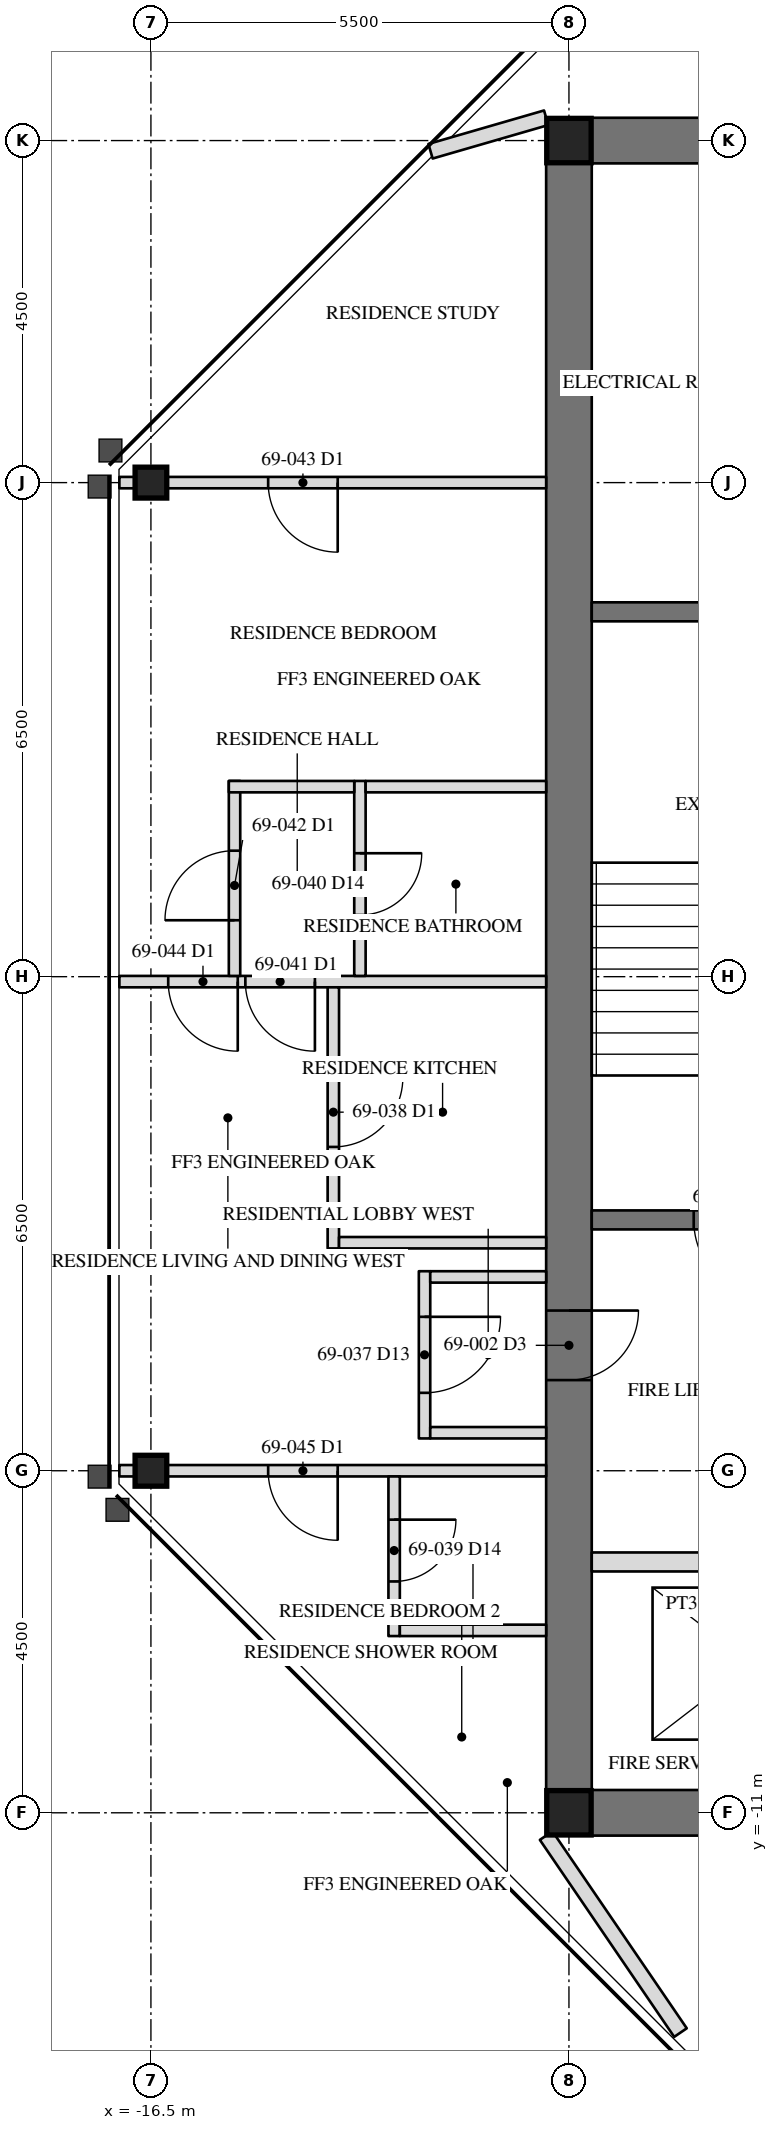
"""IFC4 building model, lengths in metres.
Left out: names, types, materials, properties, quantities, classifications, styles, units other than length and angle.
Written with IfcOpenShell. Run it as: python <this file> out.ifc"""

import sys

from ifc_helpers import new_model, si_unit, direction, frame, frame_2d, origin, origin_2d, place, context, subcontext, project, spatial, rectangle, hollow_rectangle, i_section, extrude, element, fill, save


model = new_model("IFC4")
c1 = context("Model", 3, precision=1e-05, world=origin(), true_north=direction((0.0, 1.0)))
c2 = subcontext(c1, "Body", "Model", "MODEL_VIEW")
j1 = project(units=[si_unit("LENGTHUNIT", "METRE"), si_unit("PLANEANGLEUNIT", "RADIAN")], contexts=[c1])
p1 = place(None, origin())
s1 = spatial("IfcSite", under=j1, at=p1, CompositionType="ELEMENT")
p2 = place(p1, origin())
s2 = spatial("IfcBuilding", under=s1, at=p2, CompositionType="ELEMENT")
p3 = place(p2, frame((0.0, 0.0, 281.2)))
s3 = spatial("IfcBuildingStorey", under=s2, at=p3, CompositionType="ELEMENT", Elevation=281.2)
for number, where, z_axis, x_axis in (
    (1, (-16.5, -6.5, 0.0), (0.0, 0.0, 1.0), (0.0, 1.0, 0.0)),
    (2, (-16.5, 6.5, 0.0), (0.0, 0.0, 1.0), (0.0, 1.0, 0.0)),
):
    element("IfcColumn", number, at=place(p3, frame(where, z_axis=z_axis, x_axis=x_axis)), inside=s3, PredefinedType="COLUMN", context=c2, shape_type="SweptSolid", body=[
        extrude(i_section(OverallWidth=0.406, OverallDepth=0.417, WebThickness=0.03, FlangeThickness=0.048, at=origin_2d()), origin(), (0.0, 0.0, 1.0), 3.6),
    ])
p4 = place(p3, frame((-11.0, 11.0, 0.0), z_axis=(0.0, 0.0, 1.0), x_axis=(0.0, -1.0, 0.0)))
e3 = element("IfcWall", 3, at=p4, inside=s3, PredefinedType="SHEAR", context=c2, shape_type="SweptSolid", body=[
    extrude(rectangle(XDim=22.0, YDim=0.6, at=frame_2d((11.0, 0.0))), origin(), (0.0, 0.0, 1.0), 3.6),
])
p5 = place(p4, frame((15.393, 0.0, 0.0)))
e4 = element("IfcOpeningElement", 4, at=p5, cuts=e3, PredefinedType="OPENING", context=c2, shape_type="SweptSolid", body=[
    extrude(rectangle(XDim=0.915, YDim=2.134, at=frame_2d((0.458, 1.067))), frame((0.0, 0.31, 0.0), z_axis=(0.0, -1.0, 0.0), x_axis=(1.0, 0.0, 0.0)), (0.0, 0.0, 1.0), 0.62),
])
for number, where, z_axis, x_axis in (
    (5, (-6.5, 11.0, 0.0), (0.0, 0.0, 1.0), (-1.0, 0.0, 0.0)),
    (6, (-11.0, -11.0, 0.0), (0.0, 0.0, 1.0), (1.0, 0.0, 0.0)),
):
    element("IfcWall", number, at=place(p3, frame(where, z_axis=z_axis, x_axis=x_axis)), inside=s3, PredefinedType="SHEAR", context=c2, shape_type="SweptSolid", body=[
        extrude(rectangle(XDim=4.5, YDim=0.6, at=frame_2d((2.25, 0.0))), origin(), (0.0, 0.0, 1.0), 3.6),
    ])
for number, where, z_axis, x_axis in (
    (7, (-11.0, 11.0, 0.0), (0.0, 0.0, 1.0), (1.0, 0.0, 0.0)),
    (8, (-11.0, -11.0, 0.0), (0.0, 0.0, 1.0), (1.0, 0.0, 0.0)),
):
    element("IfcColumn", number, at=place(p3, frame(where, z_axis=z_axis, x_axis=x_axis)), inside=s3, PredefinedType="COLUMN", context=c2, shape_type="SweptSolid", body=[
        extrude(hollow_rectangle(XDim=0.584, YDim=0.584, WallThickness=0.051, at=origin_2d()), origin(), (0.0, 0.0, 1.0), 3.6),
    ])
p6 = place(p3, frame((-6.95, 4.8, 0.0), z_axis=(0.0, 0.0, 1.0), x_axis=(-1.0, 0.0, 0.0)))
e9 = element("IfcWall", 9, at=p6, inside=s3, PredefinedType="SOLIDWALL", context=c2, shape_type="SweptSolid", body=[
    extrude(rectangle(XDim=3.75, YDim=0.25, at=frame_2d((1.875, 0.0))), origin(), (0.0, 0.0, 1.0), 3.41),
])
p7 = place(p3, frame((-6.95, -3.2, 0.0), z_axis=(0.0, 0.0, 1.0), x_axis=(-1.0, 0.0, 0.0)))
e10 = element("IfcWall", 10, at=p7, inside=s3, PredefinedType="SOLIDWALL", context=c2, shape_type="SweptSolid", body=[
    extrude(rectangle(XDim=3.75, YDim=0.25, at=frame_2d((1.875, 0.0))), origin(), (0.0, 0.0, 1.0), 3.41),
])
p8 = place(p7, frame((1.342, 0.0, 0.0)))
e11 = element("IfcOpeningElement", 11, at=p8, cuts=e10, PredefinedType="OPENING", context=c2, shape_type="SweptSolid", body=[
    extrude(rectangle(XDim=1.067, YDim=2.134, at=frame_2d((0.533, 1.067))), frame((0.0, 0.135, 0.0), z_axis=(0.0, -1.0, 0.0), x_axis=(1.0, 0.0, 0.0)), (0.0, 0.0, 1.0), 0.27),
])
p9 = place(p3, frame((-6.95, -7.7, 0.0), z_axis=(0.0, 0.0, 1.0), x_axis=(-1.0, 0.0, 0.0)))
e12 = element("IfcWall", 12, at=p9, inside=s3, PredefinedType="PARTITIONING", context=c2, shape_type="SweptSolid", body=[
    extrude(rectangle(XDim=3.75, YDim=0.25, at=frame_2d((1.875, 0.0))), origin(), (0.0, 0.0, 1.0), 3.41),
])
p10 = place(p9, frame((0.45, 0.0, 0.0)))
e13 = element("IfcOpeningElement", 13, at=p10, cuts=e12, PredefinedType="OPENING", context=c2, shape_type="SweptSolid", body=[
    extrude(rectangle(XDim=1.219, YDim=2.134, at=frame_2d((0.609, 1.067))), frame((0.0, 0.135, 0.0), z_axis=(0.0, -1.0, 0.0), x_axis=(1.0, 0.0, 0.0)), (0.0, 0.0, 1.0), 0.27),
])
p11 = place(p3, frame((-11.3, 11.3, 0.0), z_axis=(0.0, 0.0, 1.0), x_axis=(-0.960552344683, -0.278099250491, 0.0)))
e14 = element("IfcWall", 14, at=p11, inside=s3, PredefinedType="PARTITIONING", context=c2, shape_type="SweptSolid", body=[
    extrude(rectangle(XDim=1.584, YDim=0.2, at=frame_2d((0.792, 0.0))), origin(), (0.0, 0.0, 1.0), 3.41),
])
p12 = place(p3, frame((-11.3, -11.3, 0.0), z_axis=(0.0, 0.0, 1.0), x_axis=(0.563469639691, -0.826136771453, 0.0)))
e15 = element("IfcWall", 15, at=p12, inside=s3, PredefinedType="PARTITIONING", context=c2, shape_type="SweptSolid", body=[
    extrude(rectangle(XDim=3.137, YDim=0.2, at=frame_2d((1.568, 0.0))), origin(), (0.0, 0.0, 1.0), 2.704),
])
p13 = place(p3, frame((-11.3, 6.5, 0.0), z_axis=(0.0, 0.0, 1.0), x_axis=(-1.0, 0.0, 0.0)))
e16 = element("IfcWall", 16, at=p13, inside=s3, PredefinedType="PARTITIONING", context=c2, shape_type="SweptSolid", body=[
    extrude(rectangle(XDim=5.615, YDim=0.15, at=frame_2d((2.808, 0.0))), origin(), (0.0, 0.0, 1.0), 2.966),
])
p14 = place(p13, frame((2.742, 0.0, 0.0)))
e17 = element("IfcOpeningElement", 17, at=p14, cuts=e16, PredefinedType="OPENING", context=c2, shape_type="SweptSolid", body=[
    extrude(rectangle(XDim=0.915, YDim=2.134, at=frame_2d((0.458, 1.067))), frame((0.0, 0.085, 0.0), z_axis=(0.0, -1.0, 0.0), x_axis=(1.0, 0.0, 0.0)), (0.0, 0.0, 1.0), 0.17),
])
p15 = place(p3, frame((-11.3, -0.065, 0.0), z_axis=(0.0, 0.0, 1.0), x_axis=(-1.0, 0.0, 0.0)))
e18 = element("IfcWall", 18, at=p15, inside=s3, PredefinedType="PARTITIONING", context=c2, shape_type="SweptSolid", body=[
    extrude(rectangle(XDim=5.615, YDim=0.15, at=frame_2d((2.808, 0.0))), origin(), (0.0, 0.0, 1.0), 2.709),
])
p16 = place(p15, frame((3.042, 0.0, 0.0)))
e19 = element("IfcOpeningElement", 19, at=p16, cuts=e18, PredefinedType="OPENING", context=c2, shape_type="SweptSolid", body=[
    extrude(rectangle(XDim=0.915, YDim=2.134, at=frame_2d((0.458, 1.067))), frame((0.0, 0.085, 0.0), z_axis=(0.0, -1.0, 0.0), x_axis=(1.0, 0.0, 0.0)), (0.0, 0.0, 1.0), 0.17),
])
p17 = place(p15, frame((4.058, 0.0, 0.0)))
e20 = element("IfcOpeningElement", 20, at=p17, cuts=e18, PredefinedType="OPENING", context=c2, shape_type="SweptSolid", body=[
    extrude(rectangle(XDim=0.915, YDim=2.134, at=frame_2d((0.458, 1.067))), frame((0.0, 0.085, 0.0), z_axis=(0.0, -1.0, 0.0), x_axis=(1.0, 0.0, 0.0)), (0.0, 0.0, 1.0), 0.17),
])
p18 = place(p3, frame((-11.3, -6.5, 0.0), z_axis=(0.0, 0.0, 1.0), x_axis=(-1.0, 0.0, 0.0)))
e21 = element("IfcWall", 21, at=p18, inside=s3, PredefinedType="PARTITIONING", context=c2, shape_type="SweptSolid", body=[
    extrude(rectangle(XDim=5.615, YDim=0.15, at=frame_2d((2.808, 0.0))), origin(), (0.0, 0.0, 1.0), 2.966),
])
p19 = place(p18, frame((2.742, 0.0, 0.0)))
e22 = element("IfcOpeningElement", 22, at=p19, cuts=e21, PredefinedType="OPENING", context=c2, shape_type="SweptSolid", body=[
    extrude(rectangle(XDim=0.915, YDim=2.134, at=frame_2d((0.458, 1.067))), frame((0.0, 0.085, 0.0), z_axis=(0.0, -1.0, 0.0), x_axis=(1.0, 0.0, 0.0)), (0.0, 0.0, 1.0), 0.17),
])
p20 = place(p3, frame((-12.9, -3.875, 0.0), z_axis=(0.0, 0.0, 1.0), x_axis=(0.0, -1.0, 0.0)))
e23 = element("IfcWall", 23, at=p20, inside=s3, PredefinedType="PARTITIONING", context=c2, shape_type="SweptSolid", body=[
    extrude(rectangle(XDim=2.2, YDim=0.15, at=frame_2d((1.1, 0.0))), origin(), (0.0, 0.0, 1.0), 3.41),
])
p21 = place(p20, frame((0.6, 0.0, 0.0)))
e24 = element("IfcOpeningElement", 24, at=p21, cuts=e23, PredefinedType="OPENING", context=c2, shape_type="SweptSolid", body=[
    extrude(rectangle(XDim=1.0, YDim=2.134, at=frame_2d((0.5, 1.067))), frame((0.0, 0.085, 0.0), z_axis=(0.0, -1.0, 0.0), x_axis=(1.0, 0.0, 0.0)), (0.0, 0.0, 1.0), 0.17),
])
for number, where, z_axis, x_axis in (
    (25, (-11.3, -3.95, 0.0), (0.0, 0.0, 1.0), (-1.0, 0.0, 0.0)),
    (26, (-11.3, -6.0, 0.0), (0.0, 0.0, 1.0), (-1.0, 0.0, 0.0)),
):
    element("IfcWall", number, at=place(p3, frame(where, z_axis=z_axis, x_axis=x_axis)), inside=s3, PredefinedType="PARTITIONING", context=c2, shape_type="SweptSolid", body=[
        extrude(rectangle(XDim=1.525, YDim=0.15, at=frame_2d((0.762, 0.0))), origin(), (0.0, 0.0, 1.0), 3.41),
    ])
p22 = place(p3, frame((-14.1, -0.14, 0.0), z_axis=(0.0, 0.0, 1.0), x_axis=(0.0, -1.0, 0.0)))
e27 = element("IfcWall", 27, at=p22, inside=s3, PredefinedType="PARTITIONING", context=c2, shape_type="SweptSolid", body=[
    extrude(rectangle(XDim=3.435, YDim=0.15, at=frame_2d((1.718, 0.0))), origin(), (0.0, 0.0, 1.0), 3.41),
])
p23 = place(p22, frame((1.185, 0.0, 0.0)))
e28 = element("IfcOpeningElement", 28, at=p23, cuts=e27, PredefinedType="OPENING", context=c2, shape_type="SweptSolid", body=[
    extrude(rectangle(XDim=0.915, YDim=2.134, at=frame_2d((0.458, 1.067))), frame((0.0, 0.085, 0.0), z_axis=(0.0, -1.0, 0.0), x_axis=(1.0, 0.0, 0.0)), (0.0, 0.0, 1.0), 0.17),
])
p24 = place(p3, frame((-11.3, -3.5, 0.0), z_axis=(0.0, 0.0, 1.0), x_axis=(-1.0, 0.0, 0.0)))
e29 = element("IfcWall", 29, at=p24, inside=s3, PredefinedType="PARTITIONING", context=c2, shape_type="SweptSolid", body=[
    extrude(rectangle(XDim=2.725, YDim=0.15, at=frame_2d((1.362, 0.0))), origin(), (0.0, 0.0, 1.0), 3.41),
])
p25 = place(p3, frame((-13.3, -6.575, 0.0), z_axis=(0.0, 0.0, 1.0), x_axis=(0.0, -1.0, 0.0)))
e30 = element("IfcWall", 30, at=p25, inside=s3, PredefinedType="PARTITIONING", context=c2, shape_type="SweptSolid", body=[
    extrude(rectangle(XDim=2.1, YDim=0.15, at=frame_2d((1.05, 0.0))), origin(), (0.0, 0.0, 1.0), 3.41),
])
p26 = place(p25, frame((0.569, 0.0, 0.0)))
e31 = element("IfcOpeningElement", 31, at=p26, cuts=e30, PredefinedType="OPENING", context=c2, shape_type="SweptSolid", body=[
    extrude(rectangle(XDim=0.813, YDim=2.032, at=frame_2d((0.406, 1.016))), frame((0.0, 0.085, 0.0), z_axis=(0.0, -1.0, 0.0), x_axis=(1.0, 0.0, 0.0)), (0.0, 0.0, 1.0), 0.17),
])
p27 = place(p3, frame((-11.3, -8.6, 0.0), z_axis=(0.0, 0.0, 1.0), x_axis=(-1.0, 0.0, 0.0)))
e32 = element("IfcWall", 32, at=p27, inside=s3, PredefinedType="PARTITIONING", context=c2, shape_type="SweptSolid", body=[
    extrude(rectangle(XDim=1.925, YDim=0.15, at=frame_2d((0.962, 0.0))), origin(), (0.0, 0.0, 1.0), 3.41),
])
p28 = place(p3, frame((-13.75, 2.575, 0.0), z_axis=(0.0, 0.0, 1.0), x_axis=(0.0, -1.0, 0.0)))
e33 = element("IfcWall", 33, at=p28, inside=s3, PredefinedType="PARTITIONING", context=c2, shape_type="SweptSolid", body=[
    extrude(rectangle(XDim=2.565, YDim=0.15, at=frame_2d((1.282, 0.0))), origin(), (0.0, 0.0, 1.0), 3.41),
])
p29 = place(p28, frame((0.951, 0.0, 0.0)))
e34 = element("IfcOpeningElement", 34, at=p29, cuts=e33, PredefinedType="OPENING", context=c2, shape_type="SweptSolid", body=[
    extrude(rectangle(XDim=0.813, YDim=2.032, at=frame_2d((0.406, 1.016))), frame((0.0, 0.085, 0.0), z_axis=(0.0, -1.0, 0.0), x_axis=(1.0, 0.0, 0.0)), (0.0, 0.0, 1.0), 0.17),
])
p30 = place(p3, frame((-11.3, 2.5, 0.0), z_axis=(0.0, 0.0, 1.0), x_axis=(-1.0, 0.0, 0.0)))
e35 = element("IfcWall", 35, at=p30, inside=s3, PredefinedType="PARTITIONING", context=c2, shape_type="SweptSolid", body=[
    extrude(rectangle(XDim=2.375, YDim=0.15, at=frame_2d((1.188, 0.0))), origin(), (0.0, 0.0, 1.0), 3.41),
])
p31 = place(p3, frame((-15.4, 0.01, 0.0), z_axis=(0.0, 0.0, 1.0), x_axis=(0.0, 1.0, 0.0)))
e36 = element("IfcWall", 36, at=p31, inside=s3, PredefinedType="PARTITIONING", context=c2, shape_type="SweptSolid", body=[
    extrude(rectangle(XDim=2.565, YDim=0.15, at=frame_2d((1.282, 0.0))), origin(), (0.0, 0.0, 1.0), 3.41),
])
p32 = place(p31, frame((0.732, 0.0, 0.0)))
e37 = element("IfcOpeningElement", 37, at=p32, cuts=e36, PredefinedType="OPENING", context=c2, shape_type="SweptSolid", body=[
    extrude(rectangle(XDim=0.915, YDim=2.134, at=frame_2d((0.458, 1.067))), frame((0.0, 0.085, 0.0), z_axis=(0.0, -1.0, 0.0), x_axis=(1.0, 0.0, 0.0)), (0.0, 0.0, 1.0), 0.17),
])
p33 = place(p3, frame((-13.825, 2.5, 0.0), z_axis=(0.0, 0.0, 1.0), x_axis=(-1.0, 0.0, 0.0)))
e38 = element("IfcWall", 38, at=p33, inside=s3, PredefinedType="PARTITIONING", context=c2, shape_type="SweptSolid", body=[
    extrude(rectangle(XDim=1.65, YDim=0.15, at=frame_2d((0.825, 0.0))), origin(), (0.0, 0.0, 1.0), 3.41),
])
p34 = place(p5, origin())
e39 = element("IfcDoor", 39, at=p34, inside=s3, OperationType="SINGLE_SWING_RIGHT", PredefinedType="DOOR", context=c2, shape_type="SweptSolid", body=[
    extrude(rectangle(XDim=0.915, YDim=2.134, at=frame_2d((0.458, 1.067))), frame((0.0, -0.225, 0.0), z_axis=(0.0, -1.0, 0.0), x_axis=(1.0, 0.0, 0.0)), (0.0, 0.0, 1.0), 0.05),
])
fill(e4, e39)
p35 = place(p8, origin())
e40 = element("IfcDoor", 40, at=p35, inside=s3, OperationType="SINGLE_SWING_LEFT", PredefinedType="DOOR", context=c2, shape_type="SweptSolid", body=[
    extrude(rectangle(XDim=1.067, YDim=2.134, at=frame_2d((0.533, 1.067))), frame((0.0, 0.025, 0.0), z_axis=(0.0, -1.0, 0.0), x_axis=(1.0, 0.0, 0.0)), (0.0, 0.0, 1.0), 0.05),
])
fill(e11, e40)
p36 = place(p21, origin())
e41 = element("IfcDoor", 41, at=p36, inside=s3, OperationType="SINGLE_SWING_RIGHT", PredefinedType="DOOR", context=c2, shape_type="SweptSolid", body=[
    extrude(rectangle(XDim=1.0, YDim=2.134, at=frame_2d((0.5, 1.067))), frame((0.0, 0.025, 0.0), z_axis=(0.0, -1.0, 0.0), x_axis=(1.0, 0.0, 0.0)), (0.0, 0.0, 1.0), 0.05),
])
fill(e24, e41)
p37 = place(p23, origin())
e42 = element("IfcDoor", 42, at=p37, inside=s3, OperationType="SINGLE_SWING_LEFT", PredefinedType="DOOR", context=c2, shape_type="SweptSolid", body=[
    extrude(rectangle(XDim=0.915, YDim=2.134, at=frame_2d((0.458, 1.067))), frame((0.0, 0.025, 0.0), z_axis=(0.0, -1.0, 0.0), x_axis=(1.0, 0.0, 0.0)), (0.0, 0.0, 1.0), 0.05),
])
fill(e28, e42)
p38 = place(p26, origin())
e43 = element("IfcDoor", 43, at=p38, inside=s3, OperationType="SINGLE_SWING_LEFT", PredefinedType="DOOR", context=c2, shape_type="SweptSolid", body=[
    extrude(rectangle(XDim=0.813, YDim=2.032, at=frame_2d((0.406, 1.016))), frame((0.0, 0.025, 0.0), z_axis=(0.0, -1.0, 0.0), x_axis=(1.0, 0.0, 0.0)), (0.0, 0.0, 1.0), 0.05),
])
fill(e31, e43)
p39 = place(p29, origin())
e44 = element("IfcDoor", 44, at=p39, inside=s3, OperationType="SINGLE_SWING_LEFT", PredefinedType="DOOR", context=c2, shape_type="SweptSolid", body=[
    extrude(rectangle(XDim=0.813, YDim=2.032, at=frame_2d((0.406, 1.016))), frame((0.0, 0.025, 0.0), z_axis=(0.0, -1.0, 0.0), x_axis=(1.0, 0.0, 0.0)), (0.0, 0.0, 1.0), 0.05),
])
fill(e34, e44)
p40 = place(p16, origin())
e45 = element("IfcDoor", 45, at=p40, inside=s3, OperationType="SINGLE_SWING_LEFT", PredefinedType="DOOR", context=c2, shape_type="SweptSolid", body=[
    extrude(rectangle(XDim=0.915, YDim=2.134, at=frame_2d((0.458, 1.067))), frame((0.0, 0.025, 0.0), z_axis=(0.0, -1.0, 0.0), x_axis=(1.0, 0.0, 0.0)), (0.0, 0.0, 1.0), 0.05),
])
fill(e19, e45)
p41 = place(p32, origin())
e46 = element("IfcDoor", 46, at=p41, inside=s3, OperationType="SINGLE_SWING_LEFT", PredefinedType="DOOR", context=c2, shape_type="SweptSolid", body=[
    extrude(rectangle(XDim=0.915, YDim=2.134, at=frame_2d((0.458, 1.067))), frame((0.0, 0.025, 0.0), z_axis=(0.0, -1.0, 0.0), x_axis=(1.0, 0.0, 0.0)), (0.0, 0.0, 1.0), 0.05),
])
fill(e37, e46)
p42 = place(p14, origin())
e47 = element("IfcDoor", 47, at=p42, inside=s3, OperationType="SINGLE_SWING_LEFT", PredefinedType="DOOR", context=c2, shape_type="SweptSolid", body=[
    extrude(rectangle(XDim=0.915, YDim=2.134, at=frame_2d((0.458, 1.067))), frame((0.0, 0.025, 0.0), z_axis=(0.0, -1.0, 0.0), x_axis=(1.0, 0.0, 0.0)), (0.0, 0.0, 1.0), 0.05),
])
fill(e17, e47)
p43 = place(p17, origin())
e48 = element("IfcDoor", 48, at=p43, inside=s3, OperationType="SINGLE_SWING_LEFT", PredefinedType="DOOR", context=c2, shape_type="SweptSolid", body=[
    extrude(rectangle(XDim=0.915, YDim=2.134, at=frame_2d((0.458, 1.067))), frame((0.0, 0.025, 0.0), z_axis=(0.0, -1.0, 0.0), x_axis=(1.0, 0.0, 0.0)), (0.0, 0.0, 1.0), 0.05),
])
fill(e20, e48)
p44 = place(p19, origin())
e49 = element("IfcDoor", 49, at=p44, inside=s3, OperationType="SINGLE_SWING_LEFT", PredefinedType="DOOR", context=c2, shape_type="SweptSolid", body=[
    extrude(rectangle(XDim=0.915, YDim=2.134, at=frame_2d((0.458, 1.067))), frame((0.0, 0.025, 0.0), z_axis=(0.0, -1.0, 0.0), x_axis=(1.0, 0.0, 0.0)), (0.0, 0.0, 1.0), 0.05),
])
fill(e22, e49)
save(model, sys.argv[1])
